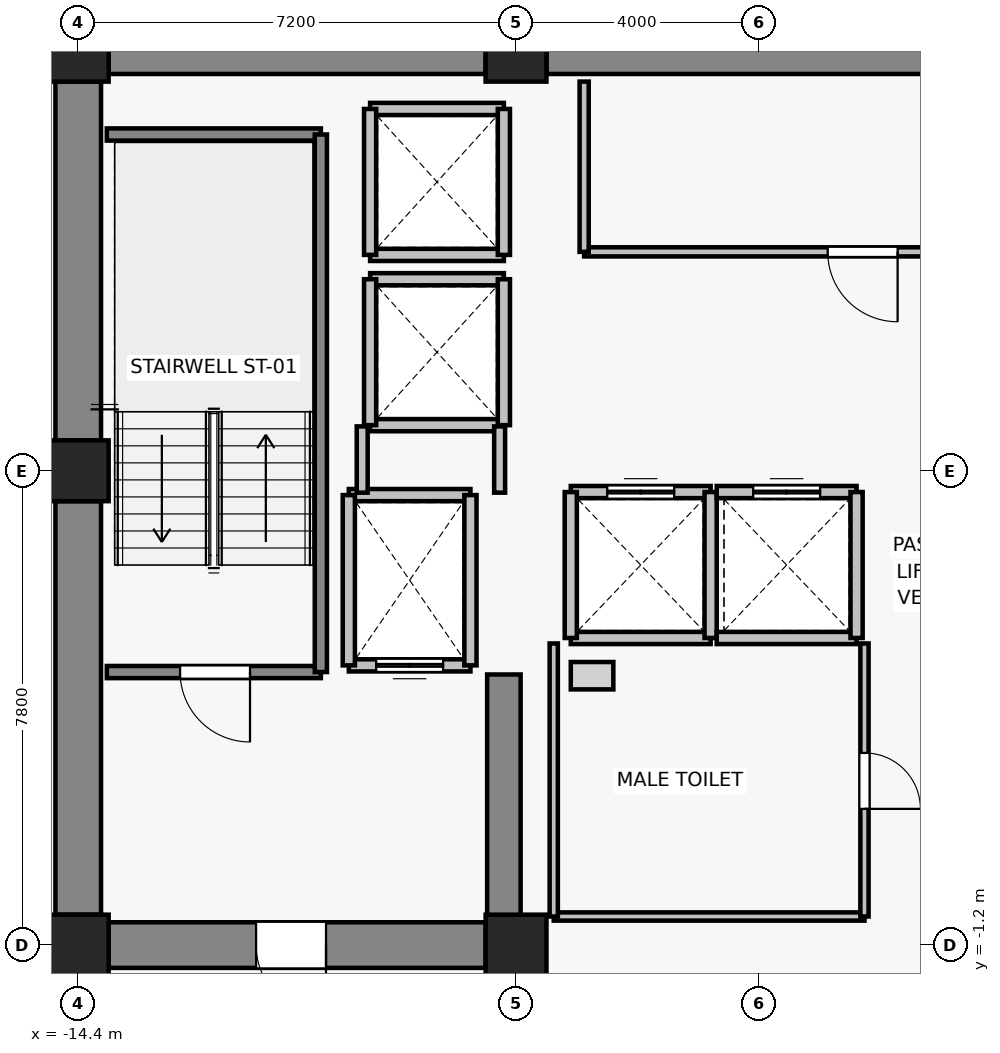
"""IFC4 building model, lengths in metres.
Left out: names, types, materials, properties, quantities, classifications, styles, units other than length and angle.
Written with IfcOpenShell. Run it as: python <this file> out.ifc"""

import sys

from ifc_helpers import new_model, si_unit, direction, frame, frame_2d, origin, origin_2d, place, context, subcontext, project, spatial, rectangle, extrude, source, transform, mapped, element, fill, save


model = new_model("IFC4")
c1 = context("Model", 3, precision=1e-05, world=origin(), true_north=direction((0.0, 1.0)))
c2 = subcontext(c1, "Body", "Model", "MODEL_VIEW")
j1 = project(units=[si_unit("LENGTHUNIT", "METRE"), si_unit("PLANEANGLEUNIT", "RADIAN")], contexts=[c1])
p1 = place(None, origin())
s1 = spatial("IfcSite", under=j1, at=p1, CompositionType="ELEMENT")
p2 = place(p1, origin())
s2 = spatial("IfcBuilding", under=s1, at=p2, CompositionType="ELEMENT")
p3 = place(p2, frame((0.0, 0.0, 106.6)))
s3 = spatial("IfcBuildingStorey", under=s2, at=p3, CompositionType="ELEMENT", Elevation=106.6)
for number, where, z_axis, x_axis in (
    (1, (-14.4, -1.2, 0.0), (0.0, 0.0, 1.0), (1.0, 0.0, 0.0)),
    (2, (-7.2, -1.2, 0.0), (0.0, 0.0, 1.0), (1.0, 0.0, 0.0)),
    (3, (-14.4, 6.6, 0.0), (0.0, 0.0, 1.0), (1.0, 0.0, 0.0)),
    (4, (-14.4, 13.5, 0.0), (0.0, 0.0, 1.0), (1.0, 0.0, 0.0)),
    (5, (-7.2, 13.5, 0.0), (0.0, 0.0, 1.0), (1.0, 0.0, 0.0)),
):
    element("IfcColumn", number, at=place(p3, frame(where, z_axis=z_axis, x_axis=x_axis)), inside=s3, PredefinedType="COLUMN", context=c2, shape_type="SweptSolid", body=[
        extrude(rectangle(XDim=1.0, YDim=1.0, at=origin_2d()), origin(), (0.0, 0.0, 1.0), 3.3),
    ])
p4 = place(p3, frame((-13.9, 13.5, 0.0), z_axis=(0.0, 0.0, 1.0), x_axis=(1.0, 0.0, 0.0)))
e6 = element("IfcWall", 6, at=p4, inside=s3, PredefinedType="SHEAR", context=c2, shape_type="SweptSolid", body=[
    extrude(rectangle(XDim=6.2, YDim=0.75, at=frame_2d((3.1, 0.0))), origin(), (0.0, 0.0, 1.0), 3.075),
])
p5 = place(p3, frame((-6.7, 13.5, 0.0), z_axis=(0.0, 0.0, 1.0), x_axis=(1.0, 0.0, 0.0)))
e7 = element("IfcWall", 7, at=p5, inside=s3, PredefinedType="SHEAR", context=c2, shape_type="SweptSolid", body=[
    extrude(rectangle(XDim=13.4, YDim=0.75, at=frame_2d((6.7, 0.0))), origin(), (0.0, 0.0, 1.0), 3.075),
])
p6 = place(p3, frame((-14.4, -0.7, 0.0), z_axis=(0.0, 0.0, 1.0), x_axis=(0.0, 1.0, 0.0)))
e8 = element("IfcWall", 8, at=p6, inside=s3, PredefinedType="SHEAR", context=c2, shape_type="SweptSolid", body=[
    extrude(rectangle(XDim=6.8, YDim=0.75, at=frame_2d((3.4, 0.0))), origin(), (0.0, 0.0, 1.0), 3.075),
])
p7 = place(p3, frame((-14.4, 7.1, 0.0), z_axis=(0.0, 0.0, 1.0), x_axis=(0.0, 1.0, 0.0)))
e9 = element("IfcWall", 9, at=p7, inside=s3, PredefinedType="SHEAR", context=c2, shape_type="SweptSolid", body=[
    extrude(rectangle(XDim=5.9, YDim=0.75, at=frame_2d((2.95, 0.0))), origin(), (0.0, 0.0, 1.0), 3.075),
])
p8 = place(p3, frame((-7.7, -1.2, 0.0), z_axis=(0.0, 0.0, 1.0), x_axis=(-1.0, 0.0, 0.0)))
e10 = element("IfcWall", 10, at=p8, inside=s3, PredefinedType="SHEAR", context=c2, shape_type="SweptSolid", body=[
    extrude(rectangle(XDim=6.2, YDim=0.75, at=frame_2d((3.1, 0.0))), origin(), (0.0, 0.0, 1.0), 3.075),
])
p9 = place(p8, frame((2.625, 0.0, 0.0)))
e11 = element("IfcOpeningElement", 11, at=p9, cuts=e10, PredefinedType="OPENING", context=c2, shape_type="SweptSolid", body=[
    extrude(rectangle(XDim=1.15, YDim=2.15, at=frame_2d((0.575, 1.075))), frame((0.0, 0.385, 0.0), z_axis=(0.0, -1.0, 0.0), x_axis=(1.0, 0.0, 0.0)), (0.0, 0.0, 1.0), 0.77),
])
p10 = place(p3, frame((-7.4, -0.825, 0.0), z_axis=(0.0, 0.0, 1.0), x_axis=(0.0, 1.0, 0.0)))
e12 = element("IfcWall", 12, at=p10, inside=s3, PredefinedType="SHEAR", context=c2, shape_type="SweptSolid", body=[
    extrude(rectangle(XDim=4.075, YDim=0.55, at=frame_2d((2.038, 0.0))), origin(), (0.0, 0.0, 1.0), 3.075),
])
p11 = place(p3, frame((-7.95, 3.4, 0.0), z_axis=(0.0, 0.0, 1.0), x_axis=(-1.0, 0.0, 0.0)))
e13 = element("IfcWall", 13, at=p11, inside=s3, PredefinedType="SOLIDWALL", context=c2, shape_type="SweptSolid", body=[
    extrude(rectangle(XDim=2.0, YDim=0.2, at=frame_2d((1.0, 0.0))), origin(), (0.0, 0.0, 1.0), 3.075),
])
p12 = place(p11, frame((0.45, 0.0, 0.0)))
e14 = element("IfcOpeningElement", 14, at=p12, cuts=e13, PredefinedType="OPENING", context=c2, shape_type="SweptSolid", body=[
    extrude(rectangle(XDim=1.1, YDim=2.2, at=frame_2d((0.55, 1.1))), frame((0.0, 0.11, 0.0), z_axis=(0.0, -1.0, 0.0), x_axis=(1.0, 0.0, 0.0)), (0.0, 0.0, 1.0), 0.22),
])
p13 = place(p3, frame((-9.95, 6.2, 0.0), z_axis=(0.0, 0.0, 1.0), x_axis=(1.0, 0.0, 0.0)))
e15 = element("IfcWall", 15, at=p13, inside=s3, PredefinedType="SOLIDWALL", context=c2, shape_type="SweptSolid", body=[
    extrude(rectangle(XDim=2.0, YDim=0.2, at=frame_2d((1.0, 0.0))), origin(), (0.0, 0.0, 1.0), 3.075),
])
for number, where, z_axis, x_axis in (
    (16, (-9.95, 3.4, 0.0), (0.0, 0.0, 1.0), (0.0, 1.0, 0.0)),
    (17, (-7.95, 6.2, 0.0), (0.0, 0.0, 1.0), (0.0, -1.0, 0.0)),
):
    element("IfcWall", number, at=place(p3, frame(where, z_axis=z_axis, x_axis=x_axis)), inside=s3, PredefinedType="SOLIDWALL", context=c2, shape_type="SweptSolid", body=[
        extrude(rectangle(XDim=2.8, YDim=0.2, at=frame_2d((1.4, 0.0))), origin(), (0.0, 0.0, 1.0), 3.075),
    ])
p14 = place(p3, frame((-4.0, 3.85, 0.0), z_axis=(0.0, 0.0, 1.0), x_axis=(-1.0, 0.0, 0.0)))
e18 = element("IfcWall", 18, at=p14, inside=s3, PredefinedType="SOLIDWALL", context=c2, shape_type="SweptSolid", body=[
    extrude(rectangle(XDim=2.3, YDim=0.2, at=frame_2d((1.15, 0.0))), origin(), (0.0, 0.0, 1.0), 3.075),
])
p15 = place(p3, frame((-6.3, 6.25, 0.0), z_axis=(0.0, 0.0, 1.0), x_axis=(1.0, 0.0, 0.0)))
e19 = element("IfcWall", 19, at=p15, inside=s3, PredefinedType="SOLIDWALL", context=c2, shape_type="SweptSolid", body=[
    extrude(rectangle(XDim=2.3, YDim=0.2, at=frame_2d((1.15, 0.0))), origin(), (0.0, 0.0, 1.0), 3.075),
])
p16 = place(p15, frame((0.6, 0.0, 0.0)))
e20 = element("IfcOpeningElement", 20, at=p16, cuts=e19, PredefinedType="OPENING", context=c2, shape_type="SweptSolid", body=[
    extrude(rectangle(XDim=1.1, YDim=2.2, at=frame_2d((0.55, 1.1))), frame((0.0, 0.11, 0.0), z_axis=(0.0, -1.0, 0.0), x_axis=(1.0, 0.0, 0.0)), (0.0, 0.0, 1.0), 0.22),
])
for number, where, z_axis, x_axis in (
    (21, (-6.3, 3.85, 0.0), (0.0, 0.0, 1.0), (0.0, 1.0, 0.0)),
    (22, (-4.0, 6.25, 0.0), (0.0, 0.0, 1.0), (0.0, -1.0, 0.0)),
):
    element("IfcWall", number, at=place(p3, frame(where, z_axis=z_axis, x_axis=x_axis)), inside=s3, PredefinedType="SOLIDWALL", context=c2, shape_type="SweptSolid", body=[
        extrude(rectangle(XDim=2.4, YDim=0.2, at=frame_2d((1.2, 0.0))), origin(), (0.0, 0.0, 1.0), 3.075),
    ])
p17 = place(p3, frame((-1.6, 3.85, 0.0), z_axis=(0.0, 0.0, 1.0), x_axis=(-1.0, 0.0, 0.0)))
e23 = element("IfcWall", 23, at=p17, inside=s3, PredefinedType="SOLIDWALL", context=c2, shape_type="SweptSolid", body=[
    extrude(rectangle(XDim=2.3, YDim=0.2, at=frame_2d((1.15, 0.0))), origin(), (0.0, 0.0, 1.0), 3.075),
])
p18 = place(p3, frame((-3.9, 6.25, 0.0), z_axis=(0.0, 0.0, 1.0), x_axis=(1.0, 0.0, 0.0)))
e24 = element("IfcWall", 24, at=p18, inside=s3, PredefinedType="SOLIDWALL", context=c2, shape_type="SweptSolid", body=[
    extrude(rectangle(XDim=2.3, YDim=0.2, at=frame_2d((1.15, 0.0))), origin(), (0.0, 0.0, 1.0), 3.075),
])
p19 = place(p18, frame((0.6, 0.0, 0.0)))
e25 = element("IfcOpeningElement", 25, at=p19, cuts=e24, PredefinedType="OPENING", context=c2, shape_type="SweptSolid", body=[
    extrude(rectangle(XDim=1.1, YDim=2.2, at=frame_2d((0.55, 1.1))), frame((0.0, 0.11, 0.0), z_axis=(0.0, -1.0, 0.0), x_axis=(1.0, 0.0, 0.0)), (0.0, 0.0, 1.0), 0.22),
])
p20 = place(p3, frame((-1.6, 6.25, 0.0), z_axis=(0.0, 0.0, 1.0), x_axis=(0.0, -1.0, 0.0)))
e26 = element("IfcWall", 26, at=p20, inside=s3, PredefinedType="SOLIDWALL", context=c2, shape_type="SweptSolid", body=[
    extrude(rectangle(XDim=2.4, YDim=0.2, at=frame_2d((1.2, 0.0))), origin(), (0.0, 0.0, 1.0), 3.075),
])
for number, where, z_axis, x_axis in (
    (27, (-7.4, 7.35, 0.0), (0.0, 0.0, 1.0), (-1.0, 0.0, 0.0)),
    (28, (-9.6, 9.75, 0.0), (0.0, 0.0, 1.0), (1.0, 0.0, 0.0)),
):
    element("IfcWall", number, at=place(p3, frame(where, z_axis=z_axis, x_axis=x_axis)), inside=s3, PredefinedType="SOLIDWALL", context=c2, shape_type="SweptSolid", body=[
        extrude(rectangle(XDim=2.2, YDim=0.2, at=frame_2d((1.1, 0.0))), origin(), (0.0, 0.0, 1.0), 2.515),
    ])
p21 = place(p3, frame((-9.6, 7.35, 0.0), z_axis=(0.0, 0.0, 1.0), x_axis=(0.0, 1.0, 0.0)))
e29 = element("IfcWall", 29, at=p21, inside=s3, PredefinedType="SOLIDWALL", context=c2, shape_type="SweptSolid", body=[
    extrude(rectangle(XDim=2.4, YDim=0.2, at=frame_2d((1.2, 0.0))), origin(), (0.0, 0.0, 1.0), 3.075),
])
p22 = place(p3, frame((-7.4, 9.75, 0.0), z_axis=(0.0, 0.0, 1.0), x_axis=(0.0, -1.0, 0.0)))
e30 = element("IfcWall", 30, at=p22, inside=s3, PredefinedType="SOLIDWALL", context=c2, shape_type="SweptSolid", body=[
    extrude(rectangle(XDim=2.4, YDim=0.2, at=frame_2d((1.2, 0.0))), origin(), (0.0, 0.0, 1.0), 2.515),
])
for number, where, z_axis, x_axis in (
    (31, (-7.4, 10.15, 0.0), (0.0, 0.0, 1.0), (-1.0, 0.0, 0.0)),
    (32, (-9.6, 12.55, 0.0), (0.0, 0.0, 1.0), (1.0, 0.0, 0.0)),
):
    element("IfcWall", number, at=place(p3, frame(where, z_axis=z_axis, x_axis=x_axis)), inside=s3, PredefinedType="SOLIDWALL", context=c2, shape_type="SweptSolid", body=[
        extrude(rectangle(XDim=2.2, YDim=0.2, at=frame_2d((1.1, 0.0))), origin(), (0.0, 0.0, 1.0), 2.515),
    ])
p23 = place(p3, frame((-9.6, 10.15, 0.0), z_axis=(0.0, 0.0, 1.0), x_axis=(0.0, 1.0, 0.0)))
e33 = element("IfcWall", 33, at=p23, inside=s3, PredefinedType="SOLIDWALL", context=c2, shape_type="SweptSolid", body=[
    extrude(rectangle(XDim=2.4, YDim=0.2, at=frame_2d((1.2, 0.0))), origin(), (0.0, 0.0, 1.0), 3.075),
])
p24 = place(p3, frame((-7.4, 12.55, 0.0), z_axis=(0.0, 0.0, 1.0), x_axis=(0.0, -1.0, 0.0)))
e34 = element("IfcWall", 34, at=p24, inside=s3, PredefinedType="SOLIDWALL", context=c2, shape_type="SweptSolid", body=[
    extrude(rectangle(XDim=2.4, YDim=0.2, at=frame_2d((1.2, 0.0))), origin(), (0.0, 0.0, 1.0), 2.515),
])
p25 = place(p3, frame((-10.41, 3.29, 0.0), z_axis=(0.0, 0.0, 1.0), x_axis=(-1.0, 0.0, 0.0)))
e35 = element("IfcWall", 35, at=p25, inside=s3, PredefinedType="SOLIDWALL", context=c2, shape_type="SweptSolid", body=[
    extrude(rectangle(XDim=3.52, YDim=0.2, at=frame_2d((1.76, 0.0))), origin(), (0.0, 0.0, 1.0), 3.075),
])
p26 = place(p25, frame((1.165, 0.0, 0.0)))
e36 = element("IfcOpeningElement", 36, at=p26, cuts=e35, PredefinedType="OPENING", context=c2, shape_type="SweptSolid", body=[
    extrude(rectangle(XDim=1.15, YDim=2.15, at=frame_2d((0.575, 1.075))), frame((0.0, 0.11, 0.0), z_axis=(0.0, -1.0, 0.0), x_axis=(1.0, 0.0, 0.0)), (0.0, 0.0, 1.0), 0.22),
])
p27 = place(p3, frame((-13.93, 12.13, 0.0), z_axis=(0.0, 0.0, 1.0), x_axis=(1.0, 0.0, 0.0)))
e37 = element("IfcWall", 37, at=p27, inside=s3, PredefinedType="SOLIDWALL", context=c2, shape_type="SweptSolid", body=[
    extrude(rectangle(XDim=3.52, YDim=0.2, at=frame_2d((1.76, 0.0))), origin(), (0.0, 0.0, 1.0), 3.075),
])
p28 = place(p3, frame((-10.41, 12.13, 0.0), z_axis=(0.0, 0.0, 1.0), x_axis=(0.0, -1.0, 0.0)))
e38 = element("IfcWall", 38, at=p28, inside=s3, PredefinedType="SOLIDWALL", context=c2, shape_type="SweptSolid", body=[
    extrude(rectangle(XDim=8.84, YDim=0.2, at=frame_2d((4.42, 0.0))), origin(), (0.0, 0.0, 1.0), 3.075),
])
p29 = place(p3, frame((-9.73, 6.24, 0.0), z_axis=(0.0, 0.0, 1.0), x_axis=(0.0, 1.0, 0.0)))
e39 = element("IfcWall", 39, at=p29, inside=s3, PredefinedType="PARTITIONING", context=c2, shape_type="SweptSolid", body=[
    extrude(rectangle(XDim=1.09, YDim=0.18, at=frame_2d((0.545, 0.0))), origin(), (0.0, 0.0, 1.0), 3.075),
])
p30 = place(p3, frame((-7.47, 7.33, 0.0), z_axis=(0.0, 0.0, 1.0), x_axis=(0.0, -1.0, 0.0)))
e40 = element("IfcWall", 40, at=p30, inside=s3, PredefinedType="PARTITIONING", context=c2, shape_type="SweptSolid", body=[
    extrude(rectangle(XDim=1.09, YDim=0.18, at=frame_2d((0.545, 0.0))), origin(), (0.0, 0.0, 1.0), 2.515),
])
p31 = place(p3, frame((6.08, 10.2, 0.0), z_axis=(0.0, 0.0, 1.0), x_axis=(-1.0, 0.0, 0.0)))
e41 = element("IfcWall", 41, at=p31, inside=s3, PredefinedType="PARTITIONING", context=c2, shape_type="SweptSolid", body=[
    extrude(rectangle(XDim=12.16, YDim=0.15, at=frame_2d((6.08, 0.0))), origin(), (0.0, 0.0, 1.0), 3.075),
])
p32 = place(p31, frame((7.005, 0.0, 0.0)))
e42 = element("IfcOpeningElement", 42, at=p32, cuts=e41, PredefinedType="OPENING", context=c2, shape_type="SweptSolid", body=[
    extrude(rectangle(XDim=1.15, YDim=2.15, at=frame_2d((0.575, 1.075))), frame((0.0, 0.085, 0.0), z_axis=(0.0, -1.0, 0.0), x_axis=(1.0, 0.0, 0.0)), (0.0, 0.0, 1.0), 0.17),
])
p33 = place(p3, frame((-6.08, 10.2, 0.0), z_axis=(0.0, 0.0, 1.0), x_axis=(0.0, 1.0, 0.0)))
e43 = element("IfcWall", 43, at=p33, inside=s3, PredefinedType="PARTITIONING", context=c2, shape_type="SweptSolid", body=[
    extrude(rectangle(XDim=2.8, YDim=0.15, at=frame_2d((1.4, 0.0))), origin(), (0.0, 0.0, 1.0), 3.075),
])
p34 = place(p3, frame((-1.47, -0.73, 0.0), z_axis=(0.0, 0.0, 1.0), x_axis=(-1.0, 0.0, 0.0)))
e44 = element("IfcWall", 44, at=p34, inside=s3, PredefinedType="PARTITIONING", context=c2, shape_type="SweptSolid", body=[
    extrude(rectangle(XDim=5.11, YDim=0.135, at=frame_2d((2.555, 0.0))), origin(), (0.0, 0.0, 1.0), 3.075),
])
p35 = place(p3, frame((-6.58, -0.73, 0.0), z_axis=(0.0, 0.0, 1.0), x_axis=(0.0, 1.0, 0.0)))
e45 = element("IfcWall", 45, at=p35, inside=s3, PredefinedType="PARTITIONING", context=c2, shape_type="SweptSolid", body=[
    extrude(rectangle(XDim=4.49, YDim=0.135, at=frame_2d((2.245, 0.0))), origin(), (0.0, 0.0, 1.0), 3.075),
])
p36 = place(p3, frame((-1.47, 3.76, 0.0), z_axis=(0.0, 0.0, 1.0), x_axis=(0.0, -1.0, 0.0)))
e46 = element("IfcWall", 46, at=p36, inside=s3, PredefinedType="PARTITIONING", context=c2, shape_type="SweptSolid", body=[
    extrude(rectangle(XDim=4.49, YDim=0.135, at=frame_2d((2.245, 0.0))), origin(), (0.0, 0.0, 1.0), 3.075),
])
p37 = place(p36, frame((1.8, 0.0, 0.0)))
e47 = element("IfcOpeningElement", 47, at=p37, cuts=e46, PredefinedType="OPENING", context=c2, shape_type="SweptSolid", body=[
    extrude(rectangle(XDim=0.92, YDim=2.1, at=frame_2d((0.46, 1.05))), frame((0.0, 0.077, 0.0), z_axis=(0.0, -1.0, 0.0), x_axis=(1.0, 0.0, 0.0)), (0.0, 0.0, 1.0), 0.155),
])
m1 = source(origin(), c2, "Body", "SweptSolid", [
    extrude(rectangle(XDim=1.1, YDim=2.2, at=frame_2d((0.55, 1.1))), frame((0.0, 0.025, 0.0), z_axis=(0.0, -1.0, 0.0), x_axis=(1.0, 0.0, 0.0)), (0.0, 0.0, 1.0), 0.05),
])
p38 = place(p12, origin())
e48 = element("IfcDoor", 48, at=p38, inside=s3, OperationType="DOUBLE_DOOR_SLIDING", PredefinedType="DOOR", context=c2, shape_type="MappedRepresentation", body=[
    mapped(m1, transform((0.0, 0.0, 0.0), x_axis=(1.0, 0.0, 0.0), y_axis=(0.0, 1.0, 0.0), z_axis=(0.0, 0.0, 1.0), scale=1.0)),
])
fill(e14, e48)
p39 = place(p16, origin())
e49 = element("IfcDoor", 49, at=p39, inside=s3, OperationType="DOUBLE_DOOR_SLIDING", PredefinedType="DOOR", context=c2, shape_type="MappedRepresentation", body=[
    mapped(m1, transform((0.0, 0.0, 0.0), x_axis=(1.0, 0.0, 0.0), y_axis=(0.0, 1.0, 0.0), z_axis=(0.0, 0.0, 1.0), scale=1.0)),
])
fill(e20, e49)
p40 = place(p19, origin())
e50 = element("IfcDoor", 50, at=p40, inside=s3, OperationType="DOUBLE_DOOR_SLIDING", PredefinedType="DOOR", context=c2, shape_type="MappedRepresentation", body=[
    mapped(m1, transform((0.0, 0.0, 0.0), x_axis=(1.0, 0.0, 0.0), y_axis=(0.0, 1.0, 0.0), z_axis=(0.0, 0.0, 1.0), scale=1.0)),
])
fill(e25, e50)
m2 = source(origin(), c2, "Body", "SweptSolid", [
    extrude(rectangle(XDim=1.15, YDim=2.15, at=frame_2d((0.575, 1.075))), frame((0.0, 0.025, 0.0), z_axis=(0.0, -1.0, 0.0), x_axis=(1.0, 0.0, 0.0)), (0.0, 0.0, 1.0), 0.05),
])
p41 = place(p26, origin())
e51 = element("IfcDoor", 51, at=p41, inside=s3, OperationType="SINGLE_SWING_LEFT", PredefinedType="DOOR", context=c2, shape_type="MappedRepresentation", body=[
    mapped(m2, transform((0.0, 0.0, 0.0), x_axis=(1.0, 0.0, 0.0), y_axis=(0.0, 1.0, 0.0), z_axis=(0.0, 0.0, 1.0), scale=1.0)),
])
fill(e36, e51)
p42 = place(p9, origin())
e52 = element("IfcDoor", 52, at=p42, inside=s3, OperationType="SINGLE_SWING_LEFT", PredefinedType="DOOR", context=c2, shape_type="MappedRepresentation", body=[
    mapped(m2, transform((0.0, 0.0, 0.0), x_axis=(1.0, 0.0, 0.0), y_axis=(0.0, 1.0, 0.0), z_axis=(0.0, 0.0, 1.0), scale=1.0)),
])
fill(e11, e52)
p43 = place(p32, origin())
e53 = element("IfcDoor", 53, at=p43, inside=s3, OperationType="SINGLE_SWING_LEFT", PredefinedType="DOOR", context=c2, shape_type="MappedRepresentation", body=[
    mapped(m2, transform((0.0, 0.0, 0.0), x_axis=(1.0, 0.0, 0.0), y_axis=(0.0, 1.0, 0.0), z_axis=(0.0, 0.0, 1.0), scale=1.0)),
])
fill(e42, e53)
m3 = source(origin(), c2, "Body", "SweptSolid", [
    extrude(rectangle(XDim=0.92, YDim=2.1, at=frame_2d((0.46, 1.05))), frame((0.0, 0.025, 0.0), z_axis=(0.0, -1.0, 0.0), x_axis=(1.0, 0.0, 0.0)), (0.0, 0.0, 1.0), 0.05),
])
p44 = place(p37, origin())
e54 = element("IfcDoor", 54, at=p44, inside=s3, OperationType="SINGLE_SWING_RIGHT", PredefinedType="DOOR", context=c2, shape_type="MappedRepresentation", body=[
    mapped(m3, transform((0.0, 0.0, 0.0), x_axis=(1.0, 0.0, 0.0), y_axis=(0.0, 1.0, 0.0), z_axis=(0.0, 0.0, 1.0), scale=1.0)),
])
fill(e47, e54)
save(model, sys.argv[1])
